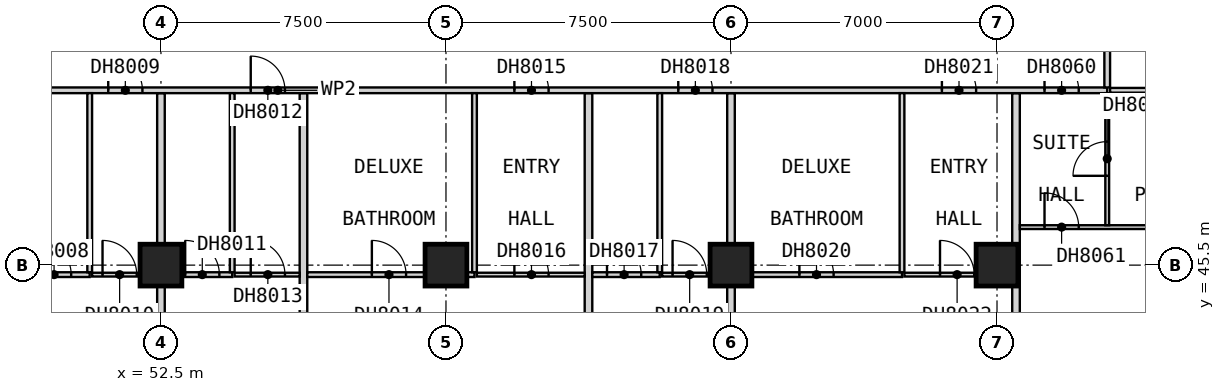
"""IFC4 building model, lengths in metres.
Left out: names, types, materials, properties, quantities, classifications, styles, units other than length and angle.
Written with IfcOpenShell. Run it as: python <this file> out.ifc"""

import sys

from ifc_helpers import new_model, si_unit, direction, frame, frame_2d, origin, origin_2d, place, context, subcontext, project, spatial, rectangle, extrude, element, fill, save


model = new_model("IFC4")
c1 = context("Model", 3, precision=1e-05, world=origin(), true_north=direction((0.0, 1.0)))
c2 = subcontext(c1, "Body", "Model", "MODEL_VIEW")
j1 = project(units=[si_unit("LENGTHUNIT", "METRE"), si_unit("PLANEANGLEUNIT", "RADIAN")], contexts=[c1])
p1 = place(None, origin())
s1 = spatial("IfcSite", under=j1, at=p1, CompositionType="ELEMENT")
p2 = place(p1, origin())
s2 = spatial("IfcBuilding", under=s1, at=p2, CompositionType="ELEMENT")
p3 = place(p2, frame((0.0, 0.0, 89.9)))
s3 = spatial("IfcBuildingStorey", under=s2, at=p3, CompositionType="ELEMENT", Elevation=89.9)
for number, where, z_axis, x_axis in (
    (1, (52.5, 45.5, 0.0), (0.0, 0.0, 1.0), (1.0, 0.0, 0.0)),
    (2, (60.0, 45.5, 0.0), (0.0, 0.0, 1.0), (1.0, 0.0, 0.0)),
    (3, (67.5, 45.5, 0.0), (0.0, 0.0, 1.0), (1.0, 0.0, 0.0)),
    (4, (74.5, 45.5, 0.0), (0.0, 0.0, 1.0), (1.0, 0.0, 0.0)),
):
    element("IfcColumn", number, at=place(p3, frame(where, z_axis=z_axis, x_axis=x_axis)), inside=s3, PredefinedType="COLUMN", context=c2, shape_type="SweptSolid", body=[
        extrude(rectangle(XDim=1.1, YDim=1.1, at=origin_2d()), origin(), (0.0, 0.0, 1.0), 3.6),
    ])
p4 = place(p3, frame((52.5, 37.5, 0.0), z_axis=(0.0, 0.0, 1.0), x_axis=(0.0, 1.0, 0.0)))
e5 = element("IfcWall", 5, at=p4, inside=s3, PredefinedType="PARTITIONING", context=c2, shape_type="SweptSolid", body=[
    extrude(rectangle(XDim=12.525, YDim=0.2, at=frame_2d((6.262, 0.0))), origin(), (0.0, 0.0, 1.0), 3.35),
])
for number, where, z_axis, x_axis in (
    (6, (56.25, 38.31, 0.0), (0.0, 0.0, 1.0), (0.0, 1.0, 0.0)),
    (7, (63.75, 38.31, 0.0), (0.0, 0.0, 1.0), (0.0, 1.0, 0.0)),
):
    element("IfcWall", number, at=place(p3, frame(where, z_axis=z_axis, x_axis=x_axis)), inside=s3, PredefinedType="PARTITIONING", context=c2, shape_type="SweptSolid", body=[
        extrude(rectangle(XDim=11.715, YDim=0.2, at=frame_2d((5.857, 0.0))), origin(), (0.0, 0.0, 1.0), 3.35),
    ])
p5 = place(p3, frame((67.5, 37.5, 0.0), z_axis=(0.0, 0.0, 1.0), x_axis=(0.0, 1.0, 0.0)))
e8 = element("IfcWall", 8, at=p5, inside=s3, PredefinedType="PARTITIONING", context=c2, shape_type="SweptSolid", body=[
    extrude(rectangle(XDim=12.525, YDim=0.2, at=frame_2d((6.262, 0.0))), origin(), (0.0, 0.0, 1.0), 3.35),
])
p6 = place(p3, frame((75.0, 38.31, 0.0), z_axis=(0.0, 0.0, 1.0), x_axis=(0.0, 1.0, 0.0)))
e9 = element("IfcWall", 9, at=p6, inside=s3, PredefinedType="PARTITIONING", context=c2, shape_type="SweptSolid", body=[
    extrude(rectangle(XDim=11.715, YDim=0.2, at=frame_2d((5.857, 0.0))), origin(), (0.0, 0.0, 1.0), 3.35),
])
p7 = place(p3, frame((33.75, 50.1, 0.0), z_axis=(0.0, 0.0, 1.0), x_axis=(1.0, 0.0, 0.0)))
e10 = element("IfcWall", 10, at=p7, inside=s3, PredefinedType="PARTITIONING", context=c2, shape_type="SweptSolid", body=[
    extrude(rectangle(XDim=43.65, YDim=0.15, at=frame_2d((21.825, 0.0))), origin(), (0.0, 0.0, 1.0), 3.35),
])
p8 = place(p7, frame((5.175, 0.0, 0.0)))
e11 = element("IfcOpeningElement", 11, at=p8, cuts=e10, PredefinedType="OPENING", context=c2, shape_type="SweptSolid", body=[
    extrude(rectangle(XDim=0.9, YDim=2.1, at=frame_2d((0.45, 1.05))), frame((0.0, 0.085, 0.0), z_axis=(0.0, -1.0, 0.0), x_axis=(1.0, 0.0, 0.0)), (0.0, 0.0, 1.0), 0.17),
])
p9 = place(p7, frame((13.05, 0.0, 0.0)))
e12 = element("IfcOpeningElement", 12, at=p9, cuts=e10, PredefinedType="OPENING", context=c2, shape_type="SweptSolid", body=[
    extrude(rectangle(XDim=0.9, YDim=2.1, at=frame_2d((0.45, 1.05))), frame((0.0, 0.085, 0.0), z_axis=(0.0, -1.0, 0.0), x_axis=(1.0, 0.0, 0.0)), (0.0, 0.0, 1.0), 0.17),
])
p10 = place(p7, frame((17.363, 0.0, 0.0)))
e13 = element("IfcOpeningElement", 13, at=p10, cuts=e10, PredefinedType="OPENING", context=c2, shape_type="SweptSolid", body=[
    extrude(rectangle(XDim=0.9, YDim=2.1, at=frame_2d((0.45, 1.05))), frame((0.0, 0.085, 0.0), z_axis=(0.0, -1.0, 0.0), x_axis=(1.0, 0.0, 0.0)), (0.0, 0.0, 1.0), 0.17),
])
p11 = place(p7, frame((21.113, 0.0, 0.0)))
e14 = element("IfcOpeningElement", 14, at=p11, cuts=e10, PredefinedType="OPENING", context=c2, shape_type="SweptSolid", body=[
    extrude(rectangle(XDim=0.9, YDim=2.1, at=frame_2d((0.45, 1.05))), frame((0.0, 0.085, 0.0), z_axis=(0.0, -1.0, 0.0), x_axis=(1.0, 0.0, 0.0)), (0.0, 0.0, 1.0), 0.17),
])
p12 = place(p7, frame((28.05, 0.0, 0.0)))
e15 = element("IfcOpeningElement", 15, at=p12, cuts=e10, PredefinedType="OPENING", context=c2, shape_type="SweptSolid", body=[
    extrude(rectangle(XDim=0.9, YDim=2.1, at=frame_2d((0.45, 1.05))), frame((0.0, 0.085, 0.0), z_axis=(0.0, -1.0, 0.0), x_axis=(1.0, 0.0, 0.0)), (0.0, 0.0, 1.0), 0.17),
])
p13 = place(p7, frame((32.363, 0.0, 0.0)))
e16 = element("IfcOpeningElement", 16, at=p13, cuts=e10, PredefinedType="OPENING", context=c2, shape_type="SweptSolid", body=[
    extrude(rectangle(XDim=0.9, YDim=2.1, at=frame_2d((0.45, 1.05))), frame((0.0, 0.085, 0.0), z_axis=(0.0, -1.0, 0.0), x_axis=(1.0, 0.0, 0.0)), (0.0, 0.0, 1.0), 0.17),
])
p14 = place(p7, frame((39.3, 0.0, 0.0)))
e17 = element("IfcOpeningElement", 17, at=p14, cuts=e10, PredefinedType="OPENING", context=c2, shape_type="SweptSolid", body=[
    extrude(rectangle(XDim=0.9, YDim=2.1, at=frame_2d((0.45, 1.05))), frame((0.0, 0.085, 0.0), z_axis=(0.0, -1.0, 0.0), x_axis=(1.0, 0.0, 0.0)), (0.0, 0.0, 1.0), 0.17),
])
p15 = place(p7, frame((42.0, 0.0, 0.0)))
e18 = element("IfcOpeningElement", 18, at=p15, cuts=e10, PredefinedType="OPENING", context=c2, shape_type="SweptSolid", body=[
    extrude(rectangle(XDim=0.9, YDim=2.1, at=frame_2d((0.45, 1.05))), frame((0.0, 0.085, 0.0), z_axis=(0.0, -1.0, 0.0), x_axis=(1.0, 0.0, 0.0)), (0.0, 0.0, 1.0), 0.17),
])
p16 = place(p3, frame((77.4, 50.175, 0.0), z_axis=(0.0, 0.0, 1.0), x_axis=(0.0, 1.0, 0.0)))
e19 = element("IfcWall", 19, at=p16, inside=s3, PredefinedType="PARTITIONING", context=c2, shape_type="SweptSolid", body=[
    extrude(rectangle(XDim=42.15, YDim=0.15, at=frame_2d((21.075, 0.0))), origin(), (0.0, 0.0, 1.0), 3.35),
])
p17 = place(p16, frame((7.875, 0.0, 0.0)))
e20 = element("IfcOpeningElement", 20, at=p17, cuts=e19, PredefinedType="OPENING", context=c2, shape_type="SweptSolid", body=[
    extrude(rectangle(XDim=0.9, YDim=2.1, at=frame_2d((0.45, 1.05))), frame((0.0, 0.085, 0.0), z_axis=(0.0, -1.0, 0.0), x_axis=(1.0, 0.0, 0.0)), (0.0, 0.0, 1.0), 0.17),
])
p18 = place(p16, frame((15.375, 0.0, 0.0)))
e21 = element("IfcOpeningElement", 21, at=p18, cuts=e19, PredefinedType="OPENING", context=c2, shape_type="SweptSolid", body=[
    extrude(rectangle(XDim=0.9, YDim=2.1, at=frame_2d((0.45, 1.05))), frame((0.0, 0.085, 0.0), z_axis=(0.0, -1.0, 0.0), x_axis=(1.0, 0.0, 0.0)), (0.0, 0.0, 1.0), 0.17),
])
p19 = place(p16, frame((30.375, 0.0, 0.0)))
e22 = element("IfcOpeningElement", 22, at=p19, cuts=e19, PredefinedType="OPENING", context=c2, shape_type="SweptSolid", body=[
    extrude(rectangle(XDim=0.9, YDim=2.1, at=frame_2d((0.45, 1.05))), frame((0.0, 0.085, 0.0), z_axis=(0.0, -1.0, 0.0), x_axis=(1.0, 0.0, 0.0)), (0.0, 0.0, 1.0), 0.17),
])
p20 = place(p3, frame((50.688, 45.25, 0.0), z_axis=(0.0, 0.0, 1.0), x_axis=(1.0, 0.0, 0.0)))
e23 = element("IfcWall", 23, at=p20, inside=s3, PredefinedType="PARTITIONING", context=c2, shape_type="SweptSolid", body=[
    extrude(rectangle(XDim=1.712, YDim=0.1, at=frame_2d((0.856, 0.0))), origin(), (0.0, 0.0, 1.0), 3.35),
])
p21 = place(p20, frame((0.275, 0.0, 0.0)))
e24 = element("IfcOpeningElement", 24, at=p21, cuts=e23, PredefinedType="OPENING", context=c2, shape_type="SweptSolid", body=[
    extrude(rectangle(XDim=0.9, YDim=2.1, at=frame_2d((0.45, 1.05))), frame((0.0, 0.06, 0.0), z_axis=(0.0, -1.0, 0.0), x_axis=(1.0, 0.0, 0.0)), (0.0, 0.0, 1.0), 0.12),
])
p22 = place(p3, frame((54.438, 45.25, 0.0), z_axis=(0.0, 0.0, 1.0), x_axis=(1.0, 0.0, 0.0)))
e25 = element("IfcWall", 25, at=p22, inside=s3, PredefinedType="PARTITIONING", context=c2, shape_type="SweptSolid", body=[
    extrude(rectangle(XDim=1.712, YDim=0.1, at=frame_2d((0.856, 0.0))), origin(), (0.0, 0.0, 1.0), 3.35),
])
p23 = place(p22, frame((0.425, 0.0, 0.0)))
e26 = element("IfcOpeningElement", 26, at=p23, cuts=e25, PredefinedType="OPENING", context=c2, shape_type="SweptSolid", body=[
    extrude(rectangle(XDim=0.9, YDim=2.1, at=frame_2d((0.45, 1.05))), frame((0.0, 0.06, 0.0), z_axis=(0.0, -1.0, 0.0), x_axis=(1.0, 0.0, 0.0)), (0.0, 0.0, 1.0), 0.12),
])
p24 = place(p3, frame((60.812, 45.25, 0.0), z_axis=(0.0, 0.0, 1.0), x_axis=(1.0, 0.0, 0.0)))
e27 = element("IfcWall", 27, at=p24, inside=s3, PredefinedType="PARTITIONING", context=c2, shape_type="SweptSolid", body=[
    extrude(rectangle(XDim=2.837, YDim=0.1, at=frame_2d((1.419, 0.0))), origin(), (0.0, 0.0, 1.0), 3.35),
])
p25 = place(p24, frame((0.988, 0.0, 0.0)))
e28 = element("IfcOpeningElement", 28, at=p25, cuts=e27, PredefinedType="OPENING", context=c2, shape_type="SweptSolid", body=[
    extrude(rectangle(XDim=0.9, YDim=2.1, at=frame_2d((0.45, 1.05))), frame((0.0, 0.06, 0.0), z_axis=(0.0, -1.0, 0.0), x_axis=(1.0, 0.0, 0.0)), (0.0, 0.0, 1.0), 0.12),
])
p26 = place(p3, frame((65.688, 45.25, 0.0), z_axis=(0.0, 0.0, 1.0), x_axis=(1.0, 0.0, 0.0)))
e29 = element("IfcWall", 29, at=p26, inside=s3, PredefinedType="PARTITIONING", context=c2, shape_type="SweptSolid", body=[
    extrude(rectangle(XDim=1.712, YDim=0.1, at=frame_2d((0.856, 0.0))), origin(), (0.0, 0.0, 1.0), 3.35),
])
p27 = place(p26, frame((0.275, 0.0, 0.0)))
e30 = element("IfcOpeningElement", 30, at=p27, cuts=e29, PredefinedType="OPENING", context=c2, shape_type="SweptSolid", body=[
    extrude(rectangle(XDim=0.9, YDim=2.1, at=frame_2d((0.45, 1.05))), frame((0.0, 0.06, 0.0), z_axis=(0.0, -1.0, 0.0), x_axis=(1.0, 0.0, 0.0)), (0.0, 0.0, 1.0), 0.12),
])
p28 = place(p3, frame((72.062, 45.25, 0.0), z_axis=(0.0, 0.0, 1.0), x_axis=(1.0, 0.0, 0.0)))
e31 = element("IfcWall", 31, at=p28, inside=s3, PredefinedType="PARTITIONING", context=c2, shape_type="SweptSolid", body=[
    extrude(rectangle(XDim=2.837, YDim=0.1, at=frame_2d((1.419, 0.0))), origin(), (0.0, 0.0, 1.0), 3.35),
])
p29 = place(p28, frame((0.938, 0.0, 0.0)))
e32 = element("IfcOpeningElement", 32, at=p29, cuts=e31, PredefinedType="OPENING", context=c2, shape_type="SweptSolid", body=[
    extrude(rectangle(XDim=0.9, YDim=2.1, at=frame_2d((0.45, 1.05))), frame((0.0, 0.06, 0.0), z_axis=(0.0, -1.0, 0.0), x_axis=(1.0, 0.0, 0.0)), (0.0, 0.0, 1.0), 0.12),
])
p30 = place(p3, frame((75.1, 46.5, 0.0), z_axis=(0.0, 0.0, 1.0), x_axis=(1.0, 0.0, 0.0)))
e33 = element("IfcWall", 33, at=p30, inside=s3, PredefinedType="PARTITIONING", context=c2, shape_type="SweptSolid", body=[
    extrude(rectangle(XDim=7.35, YDim=0.1, at=frame_2d((3.675, 0.0))), origin(), (0.0, 0.0, 1.0), 3.35),
])
p31 = place(p30, frame((0.65, 0.0, 0.0)))
e34 = element("IfcOpeningElement", 34, at=p31, cuts=e33, PredefinedType="OPENING", context=c2, shape_type="SweptSolid", body=[
    extrude(rectangle(XDim=0.9, YDim=2.1, at=frame_2d((0.45, 1.05))), frame((0.0, 0.06, 0.0), z_axis=(0.0, -1.0, 0.0), x_axis=(1.0, 0.0, 0.0)), (0.0, 0.0, 1.0), 0.12),
])
p32 = place(p3, frame((77.4, 46.55, 0.0), z_axis=(0.0, 0.0, 1.0), x_axis=(0.0, 1.0, 0.0)))
e35 = element("IfcWall", 35, at=p32, inside=s3, PredefinedType="PARTITIONING", context=c2, shape_type="SweptSolid", body=[
    extrude(rectangle(XDim=3.475, YDim=0.1, at=frame_2d((1.737, 0.0))), origin(), (0.0, 0.0, 1.0), 3.35),
])
p33 = place(p32, frame((1.3, 0.0, 0.0)))
e36 = element("IfcOpeningElement", 36, at=p33, cuts=e35, PredefinedType="OPENING", context=c2, shape_type="SweptSolid", body=[
    extrude(rectangle(XDim=0.9, YDim=2.1, at=frame_2d((0.45, 1.05))), frame((0.0, 0.06, 0.0), z_axis=(0.0, -1.0, 0.0), x_axis=(1.0, 0.0, 0.0)), (0.0, 0.0, 1.0), 0.12),
])
p34 = place(p3, frame((48.85, 45.25, 0.0), z_axis=(0.0, 0.0, 1.0), x_axis=(1.0, 0.0, 0.0)))
e37 = element("IfcWall", 37, at=p34, inside=s3, PredefinedType="PARTITIONING", context=c2, shape_type="SweptSolid", body=[
    extrude(rectangle(XDim=1.775, YDim=0.125, at=frame_2d((0.887, 0.0))), origin(), (0.0, 0.0, 1.0), 3.35),
])
p35 = place(p34, frame((0.387, 0.0, 0.0)))
e38 = element("IfcOpeningElement", 38, at=p35, cuts=e37, PredefinedType="OPENING", context=c2, shape_type="SweptSolid", body=[
    extrude(rectangle(XDim=0.9, YDim=2.1, at=frame_2d((0.45, 1.05))), frame((0.0, 0.073, 0.0), z_axis=(0.0, -1.0, 0.0), x_axis=(1.0, 0.0, 0.0)), (0.0, 0.0, 1.0), 0.145),
])
p36 = place(p3, frame((52.6, 45.25, 0.0), z_axis=(0.0, 0.0, 1.0), x_axis=(1.0, 0.0, 0.0)))
e39 = element("IfcWall", 39, at=p36, inside=s3, PredefinedType="PARTITIONING", context=c2, shape_type="SweptSolid", body=[
    extrude(rectangle(XDim=1.775, YDim=0.125, at=frame_2d((0.887, 0.0))), origin(), (0.0, 0.0, 1.0), 3.35),
])
p37 = place(p36, frame((0.538, 0.0, 0.0)))
e40 = element("IfcOpeningElement", 40, at=p37, cuts=e39, PredefinedType="OPENING", context=c2, shape_type="SweptSolid", body=[
    extrude(rectangle(XDim=0.9, YDim=2.1, at=frame_2d((0.45, 1.05))), frame((0.0, 0.073, 0.0), z_axis=(0.0, -1.0, 0.0), x_axis=(1.0, 0.0, 0.0)), (0.0, 0.0, 1.0), 0.145),
])
p38 = place(p3, frame((56.35, 45.25, 0.0), z_axis=(0.0, 0.0, 1.0), x_axis=(1.0, 0.0, 0.0)))
e41 = element("IfcWall", 41, at=p38, inside=s3, PredefinedType="PARTITIONING", context=c2, shape_type="SweptSolid", body=[
    extrude(rectangle(XDim=4.4, YDim=0.125, at=frame_2d((2.2, 0.0))), origin(), (0.0, 0.0, 1.0), 3.35),
])
p39 = place(p38, frame((1.7, 0.0, 0.0)))
e42 = element("IfcOpeningElement", 42, at=p39, cuts=e41, PredefinedType="OPENING", context=c2, shape_type="SweptSolid", body=[
    extrude(rectangle(XDim=0.9, YDim=2.1, at=frame_2d((0.45, 1.05))), frame((0.0, 0.073, 0.0), z_axis=(0.0, -1.0, 0.0), x_axis=(1.0, 0.0, 0.0)), (0.0, 0.0, 1.0), 0.145),
])
p40 = place(p3, frame((63.85, 45.25, 0.0), z_axis=(0.0, 0.0, 1.0), x_axis=(1.0, 0.0, 0.0)))
e43 = element("IfcWall", 43, at=p40, inside=s3, PredefinedType="PARTITIONING", context=c2, shape_type="SweptSolid", body=[
    extrude(rectangle(XDim=1.775, YDim=0.125, at=frame_2d((0.887, 0.0))), origin(), (0.0, 0.0, 1.0), 3.35),
])
p41 = place(p40, frame((0.387, 0.0, 0.0)))
e44 = element("IfcOpeningElement", 44, at=p41, cuts=e43, PredefinedType="OPENING", context=c2, shape_type="SweptSolid", body=[
    extrude(rectangle(XDim=0.9, YDim=2.1, at=frame_2d((0.45, 1.05))), frame((0.0, 0.073, 0.0), z_axis=(0.0, -1.0, 0.0), x_axis=(1.0, 0.0, 0.0)), (0.0, 0.0, 1.0), 0.145),
])
p42 = place(p3, frame((67.6, 45.25, 0.0), z_axis=(0.0, 0.0, 1.0), x_axis=(1.0, 0.0, 0.0)))
e45 = element("IfcWall", 45, at=p42, inside=s3, PredefinedType="PARTITIONING", context=c2, shape_type="SweptSolid", body=[
    extrude(rectangle(XDim=4.4, YDim=0.125, at=frame_2d((2.2, 0.0))), origin(), (0.0, 0.0, 1.0), 3.35),
])
p43 = place(p42, frame((1.7, 0.0, 0.0)))
e46 = element("IfcOpeningElement", 46, at=p43, cuts=e45, PredefinedType="OPENING", context=c2, shape_type="SweptSolid", body=[
    extrude(rectangle(XDim=0.9, YDim=2.1, at=frame_2d((0.45, 1.05))), frame((0.0, 0.073, 0.0), z_axis=(0.0, -1.0, 0.0), x_axis=(1.0, 0.0, 0.0)), (0.0, 0.0, 1.0), 0.145),
])
p44 = place(p3, frame((77.475, 50.1, 0.0), z_axis=(0.0, 0.0, 1.0), x_axis=(1.0, 0.0, 0.0)))
e47 = element("IfcWall", 47, at=p44, inside=s3, PredefinedType="PARTITIONING", context=c2, shape_type="SweptSolid", body=[
    extrude(rectangle(XDim=5.025, YDim=0.125, at=frame_2d((2.512, 0.0))), origin(), (0.0, 0.0, 1.0), 3.35),
])
for number, where, z_axis, x_axis in (
    (48, (50.625, 45.312, 0.0), (0.0, 0.0, 1.0), (0.0, 1.0, 0.0)),
    (49, (54.375, 45.312, 0.0), (0.0, 0.0, 1.0), (0.0, 1.0, 0.0)),
    (50, (60.75, 45.312, 0.0), (0.0, 0.0, 1.0), (0.0, 1.0, 0.0)),
    (51, (65.625, 45.312, 0.0), (0.0, 0.0, 1.0), (0.0, 1.0, 0.0)),
    (52, (72.0, 45.312, 0.0), (0.0, 0.0, 1.0), (0.0, 1.0, 0.0)),
):
    element("IfcWall", number, at=place(p3, frame(where, z_axis=z_axis, x_axis=x_axis)), inside=s3, PredefinedType="PARTITIONING", context=c2, shape_type="SweptSolid", body=[
        extrude(rectangle(XDim=4.712, YDim=0.125, at=frame_2d((2.356, 0.0))), origin(), (0.0, 0.0, 1.0), 3.35),
    ])
p45 = place(p35, origin())
e53 = element("IfcDoor", 53, at=p45, inside=s3, OperationType="SINGLE_SWING_LEFT", PredefinedType="DOOR", context=c2, shape_type="SweptSolid", body=[
    extrude(rectangle(XDim=0.9, YDim=2.1, at=frame_2d((0.45, 1.05))), frame((0.0, 0.025, 0.0), z_axis=(0.0, -1.0, 0.0), x_axis=(1.0, 0.0, 0.0)), (0.0, 0.0, 1.0), 0.05),
])
fill(e38, e53)
p46 = place(p10, origin())
e54 = element("IfcDoor", 54, at=p46, inside=s3, OperationType="SINGLE_SWING_RIGHT", PredefinedType="DOOR", context=c2, shape_type="SweptSolid", body=[
    extrude(rectangle(XDim=0.9, YDim=2.1, at=frame_2d((0.45, 1.05))), frame((0.0, 0.025, 0.0), z_axis=(0.0, -1.0, 0.0), x_axis=(1.0, 0.0, 0.0)), (0.0, 0.0, 1.0), 0.05),
])
fill(e13, e54)
p47 = place(p21, origin())
e55 = element("IfcDoor", 55, at=p47, inside=s3, OperationType="SINGLE_SWING_LEFT", PredefinedType="DOOR", context=c2, shape_type="SweptSolid", body=[
    extrude(rectangle(XDim=0.9, YDim=2.1, at=frame_2d((0.45, 1.05))), frame((0.0, 0.025, 0.0), z_axis=(0.0, -1.0, 0.0), x_axis=(1.0, 0.0, 0.0)), (0.0, 0.0, 1.0), 0.05),
])
fill(e24, e55)
p48 = place(p37, origin())
e56 = element("IfcDoor", 56, at=p48, inside=s3, OperationType="SINGLE_SWING_RIGHT", PredefinedType="DOOR", context=c2, shape_type="SweptSolid", body=[
    extrude(rectangle(XDim=0.9, YDim=2.1, at=frame_2d((0.45, 1.05))), frame((0.0, 0.025, 0.0), z_axis=(0.0, -1.0, 0.0), x_axis=(1.0, 0.0, 0.0)), (0.0, 0.0, 1.0), 0.05),
])
fill(e40, e56)
p49 = place(p11, origin())
e57 = element("IfcDoor", 57, at=p49, inside=s3, OperationType="SINGLE_SWING_RIGHT", PredefinedType="DOOR", context=c2, shape_type="SweptSolid", body=[
    extrude(rectangle(XDim=0.9, YDim=2.1, at=frame_2d((0.45, 1.05))), frame((0.0, 0.025, 0.0), z_axis=(0.0, -1.0, 0.0), x_axis=(1.0, 0.0, 0.0)), (0.0, 0.0, 1.0), 0.05),
])
fill(e14, e57)
p50 = place(p23, origin())
e58 = element("IfcDoor", 58, at=p50, inside=s3, OperationType="SINGLE_SWING_LEFT", PredefinedType="DOOR", context=c2, shape_type="SweptSolid", body=[
    extrude(rectangle(XDim=0.9, YDim=2.1, at=frame_2d((0.45, 1.05))), frame((0.0, 0.025, 0.0), z_axis=(0.0, -1.0, 0.0), x_axis=(1.0, 0.0, 0.0)), (0.0, 0.0, 1.0), 0.05),
])
fill(e26, e58)
p51 = place(p39, origin())
e59 = element("IfcDoor", 59, at=p51, inside=s3, OperationType="SINGLE_SWING_LEFT", PredefinedType="DOOR", context=c2, shape_type="SweptSolid", body=[
    extrude(rectangle(XDim=0.9, YDim=2.1, at=frame_2d((0.45, 1.05))), frame((0.0, 0.025, 0.0), z_axis=(0.0, -1.0, 0.0), x_axis=(1.0, 0.0, 0.0)), (0.0, 0.0, 1.0), 0.05),
])
fill(e42, e59)
p52 = place(p12, origin())
e60 = element("IfcDoor", 60, at=p52, inside=s3, OperationType="SINGLE_SWING_RIGHT", PredefinedType="DOOR", context=c2, shape_type="SweptSolid", body=[
    extrude(rectangle(XDim=0.9, YDim=2.1, at=frame_2d((0.45, 1.05))), frame((0.0, 0.025, 0.0), z_axis=(0.0, -1.0, 0.0), x_axis=(1.0, 0.0, 0.0)), (0.0, 0.0, 1.0), 0.05),
])
fill(e15, e60)
p53 = place(p25, origin())
e61 = element("IfcDoor", 61, at=p53, inside=s3, OperationType="SINGLE_SWING_LEFT", PredefinedType="DOOR", context=c2, shape_type="SweptSolid", body=[
    extrude(rectangle(XDim=0.9, YDim=2.1, at=frame_2d((0.45, 1.05))), frame((0.0, 0.025, 0.0), z_axis=(0.0, -1.0, 0.0), x_axis=(1.0, 0.0, 0.0)), (0.0, 0.0, 1.0), 0.05),
])
fill(e28, e61)
p54 = place(p41, origin())
e62 = element("IfcDoor", 62, at=p54, inside=s3, OperationType="SINGLE_SWING_LEFT", PredefinedType="DOOR", context=c2, shape_type="SweptSolid", body=[
    extrude(rectangle(XDim=0.9, YDim=2.1, at=frame_2d((0.45, 1.05))), frame((0.0, 0.025, 0.0), z_axis=(0.0, -1.0, 0.0), x_axis=(1.0, 0.0, 0.0)), (0.0, 0.0, 1.0), 0.05),
])
fill(e44, e62)
p55 = place(p13, origin())
e63 = element("IfcDoor", 63, at=p55, inside=s3, OperationType="SINGLE_SWING_RIGHT", PredefinedType="DOOR", context=c2, shape_type="SweptSolid", body=[
    extrude(rectangle(XDim=0.9, YDim=2.1, at=frame_2d((0.45, 1.05))), frame((0.0, 0.025, 0.0), z_axis=(0.0, -1.0, 0.0), x_axis=(1.0, 0.0, 0.0)), (0.0, 0.0, 1.0), 0.05),
])
fill(e16, e63)
p56 = place(p27, origin())
e64 = element("IfcDoor", 64, at=p56, inside=s3, OperationType="SINGLE_SWING_LEFT", PredefinedType="DOOR", context=c2, shape_type="SweptSolid", body=[
    extrude(rectangle(XDim=0.9, YDim=2.1, at=frame_2d((0.45, 1.05))), frame((0.0, 0.025, 0.0), z_axis=(0.0, -1.0, 0.0), x_axis=(1.0, 0.0, 0.0)), (0.0, 0.0, 1.0), 0.05),
])
fill(e30, e64)
p57 = place(p43, origin())
e65 = element("IfcDoor", 65, at=p57, inside=s3, OperationType="SINGLE_SWING_LEFT", PredefinedType="DOOR", context=c2, shape_type="SweptSolid", body=[
    extrude(rectangle(XDim=0.9, YDim=2.1, at=frame_2d((0.45, 1.05))), frame((0.0, 0.025, 0.0), z_axis=(0.0, -1.0, 0.0), x_axis=(1.0, 0.0, 0.0)), (0.0, 0.0, 1.0), 0.05),
])
fill(e46, e65)
p58 = place(p14, origin())
e66 = element("IfcDoor", 66, at=p58, inside=s3, OperationType="SINGLE_SWING_RIGHT", PredefinedType="DOOR", context=c2, shape_type="SweptSolid", body=[
    extrude(rectangle(XDim=0.9, YDim=2.1, at=frame_2d((0.45, 1.05))), frame((0.0, 0.025, 0.0), z_axis=(0.0, -1.0, 0.0), x_axis=(1.0, 0.0, 0.0)), (0.0, 0.0, 1.0), 0.05),
])
fill(e17, e66)
p59 = place(p29, origin())
e67 = element("IfcDoor", 67, at=p59, inside=s3, OperationType="SINGLE_SWING_LEFT", PredefinedType="DOOR", context=c2, shape_type="SweptSolid", body=[
    extrude(rectangle(XDim=0.9, YDim=2.1, at=frame_2d((0.45, 1.05))), frame((0.0, 0.025, 0.0), z_axis=(0.0, -1.0, 0.0), x_axis=(1.0, 0.0, 0.0)), (0.0, 0.0, 1.0), 0.05),
])
fill(e32, e67)
p60 = place(p15, origin())
e68 = element("IfcDoor", 68, at=p60, inside=s3, OperationType="SINGLE_SWING_LEFT", PredefinedType="DOOR", context=c2, shape_type="SweptSolid", body=[
    extrude(rectangle(XDim=0.9, YDim=2.1, at=frame_2d((0.45, 1.05))), frame((0.0, 0.025, 0.0), z_axis=(0.0, -1.0, 0.0), x_axis=(1.0, 0.0, 0.0)), (0.0, 0.0, 1.0), 0.05),
])
fill(e18, e68)
p61 = place(p31, origin())
e69 = element("IfcDoor", 69, at=p61, inside=s3, OperationType="SINGLE_SWING_RIGHT", PredefinedType="DOOR", context=c2, shape_type="SweptSolid", body=[
    extrude(rectangle(XDim=0.9, YDim=2.1, at=frame_2d((0.45, 1.05))), frame((0.0, 0.025, 0.0), z_axis=(0.0, -1.0, 0.0), x_axis=(1.0, 0.0, 0.0)), (0.0, 0.0, 1.0), 0.05),
])
fill(e34, e69)
p62 = place(p33, origin())
e70 = element("IfcDoor", 70, at=p62, inside=s3, OperationType="SINGLE_SWING_RIGHT", PredefinedType="DOOR", context=c2, shape_type="SweptSolid", body=[
    extrude(rectangle(XDim=0.9, YDim=2.1, at=frame_2d((0.45, 1.05))), frame((0.0, 0.025, 0.0), z_axis=(0.0, -1.0, 0.0), x_axis=(1.0, 0.0, 0.0)), (0.0, 0.0, 1.0), 0.05),
])
fill(e36, e70)
save(model, sys.argv[1])
